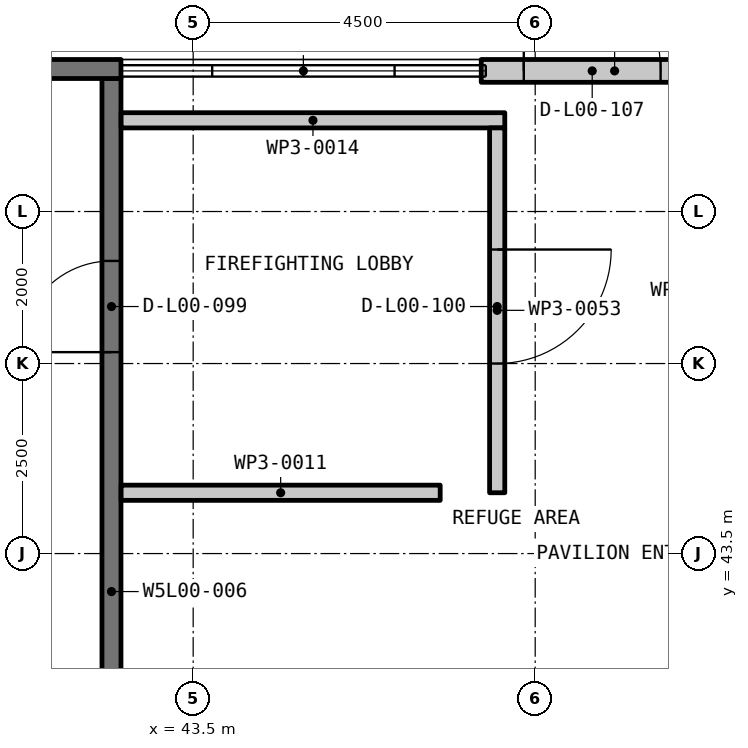
"""IFC4 building model, lengths in metres.
Left out: names, types, materials, properties, quantities, classifications, styles, units other than length and angle.
Written with IfcOpenShell. Run it as: python <this file> out.ifc"""

import sys

from ifc_helpers import new_model, si_unit, direction, frame, frame_2d, origin, place, context, subcontext, project, spatial, rectangle, extrude, element, fill, save


model = new_model("IFC4")
c1 = context("Model", 3, precision=1e-05, world=origin(), true_north=direction((0.0, 1.0)))
c2 = subcontext(c1, "Body", "Model", "MODEL_VIEW")
j1 = project(units=[si_unit("LENGTHUNIT", "METRE"), si_unit("PLANEANGLEUNIT", "RADIAN")], contexts=[c1])
p1 = place(None, origin())
s1 = spatial("IfcSite", under=j1, at=p1, CompositionType="ELEMENT")
p2 = place(p1, origin())
s2 = spatial("IfcBuilding", under=s1, at=p2, CompositionType="ELEMENT")
p3 = place(p2, origin())
s3 = spatial("IfcBuildingStorey", under=s2, at=p3, CompositionType="ELEMENT", Elevation=0.0)
p4 = place(p3, frame((42.425, 36.25, -0.2), z_axis=(0.0, 0.0, 1.0), x_axis=(0.0, 1.0, 0.0)))
e1 = element("IfcWall", 1, at=p4, inside=s3, PredefinedType="SHEAR", context=c2, shape_type="SweptSolid", body=[
    extrude(rectangle(XDim=13.5, YDim=0.25, at=frame_2d((6.75, 0.0))), origin(), (0.0, 0.0, 1.0), 5.9),
])
p5 = place(p4, frame((9.9, 0.0, 0.2)))
e2 = element("IfcOpeningElement", 2, at=p5, cuts=e1, PredefinedType="OPENING", context=c2, shape_type="SweptSolid", body=[
    extrude(rectangle(XDim=1.2, YDim=2.2, at=frame_2d((0.6, 1.1))), frame((0.0, 0.135, 0.0), z_axis=(0.0, -1.0, 0.0), x_axis=(1.0, 0.0, 0.0)), (0.0, 0.0, 1.0), 0.27),
])
p6 = place(p3, frame((36.0, 49.875, -0.2), z_axis=(0.0, 0.0, 1.0), x_axis=(1.0, 0.0, 0.0)))
e3 = element("IfcWall", 3, at=p6, inside=s3, PredefinedType="SHEAR", context=c2, shape_type="SweptSolid", body=[
    extrude(rectangle(XDim=6.55, YDim=0.25, at=frame_2d((3.275, 0.0))), origin(), (0.0, 0.0, 1.0), 5.9),
])
p7 = place(p3, frame((47.29, 49.85, 0.0), z_axis=(0.0, 0.0, 1.0), x_axis=(1.0, 0.0, 0.0)))
e4 = element("IfcWall", 4, at=p7, inside=s3, PredefinedType="SOLIDWALL", context=c2, shape_type="SweptSolid", body=[
    extrude(rectangle(XDim=3.51, YDim=0.3, at=frame_2d((1.755, 0.0))), origin(), (0.0, 0.0, 1.0), 4.9),
])
p8 = place(p7, frame((0.56, 0.0, 0.0)))
e5 = element("IfcOpeningElement", 5, at=p8, cuts=e4, PredefinedType="OPENING", context=c2, shape_type="SweptSolid", body=[
    extrude(rectangle(XDim=1.8, YDim=2.4, at=frame_2d((0.9, 1.2))), frame((0.0, 0.16, 0.0), z_axis=(0.0, -1.0, 0.0), x_axis=(1.0, 0.0, 0.0)), (0.0, 0.0, 1.0), 0.32),
])
p9 = place(p3, frame((42.552, 44.3, 0.0), z_axis=(0.0, 0.0, 1.0), x_axis=(1.0, 0.0, 0.0)))
e6 = element("IfcWall", 6, at=p9, inside=s3, PredefinedType="PARTITIONING", context=c2, shape_type="SweptSolid", body=[
    extrude(rectangle(XDim=4.198, YDim=0.2, at=frame_2d((2.099, 0.0))), origin(), (0.0, 0.0, 1.0), 5.7),
])
p10 = place(p3, frame((42.552, 49.2, 0.0), z_axis=(0.0, 0.0, 1.0), x_axis=(1.0, 0.0, 0.0)))
e7 = element("IfcWall", 7, at=p10, inside=s3, PredefinedType="PARTITIONING", context=c2, shape_type="SweptSolid", body=[
    extrude(rectangle(XDim=5.048, YDim=0.2, at=frame_2d((2.524, 0.0))), origin(), (0.0, 0.0, 1.0), 5.7),
])
p11 = place(p3, frame((47.5, 49.1, 0.0), z_axis=(0.0, 0.0, 1.0), x_axis=(0.0, -1.0, 0.0)))
e8 = element("IfcWall", 8, at=p11, inside=s3, PredefinedType="PARTITIONING", context=c2, shape_type="SweptSolid", body=[
    extrude(rectangle(XDim=4.8, YDim=0.2, at=frame_2d((2.4, 0.0))), origin(), (0.0, 0.0, 1.0), 5.7),
])
p12 = place(p11, frame((1.6, 0.0, 0.0)))
e9 = element("IfcOpeningElement", 9, at=p12, cuts=e8, PredefinedType="OPENING", context=c2, shape_type="SweptSolid", body=[
    extrude(rectangle(XDim=1.5, YDim=2.1, at=frame_2d((0.75, 1.05))), frame((0.0, 0.11, 0.0), z_axis=(0.0, -1.0, 0.0), x_axis=(1.0, 0.0, 0.0)), (0.0, 0.0, 1.0), 0.22),
])
p13 = place(p8, origin())
e10 = element("IfcDoor", 10, at=p13, inside=s3, OperationType="SINGLE_SWING_LEFT", PredefinedType="DOOR", context=c2, shape_type="SweptSolid", body=[
    extrude(rectangle(XDim=1.8, YDim=2.4, at=frame_2d((0.9, 1.2))), frame((0.0, 0.025, 0.0), z_axis=(0.0, -1.0, 0.0), x_axis=(1.0, 0.0, 0.0)), (0.0, 0.0, 1.0), 0.05),
])
fill(e5, e10)
p14 = place(p5, origin())
e11 = element("IfcDoor", 11, at=p14, inside=s3, OperationType="SINGLE_SWING_LEFT", PredefinedType="DOOR", context=c2, shape_type="SweptSolid", body=[
    extrude(rectangle(XDim=1.2, YDim=2.2, at=frame_2d((0.6, 1.1))), frame((0.0, 0.025, 0.0), z_axis=(0.0, -1.0, 0.0), x_axis=(1.0, 0.0, 0.0)), (0.0, 0.0, 1.0), 0.05),
])
fill(e2, e11)
p15 = place(p12, origin())
e12 = element("IfcDoor", 12, at=p15, inside=s3, OperationType="DOUBLE_DOOR_SINGLE_SWING", PredefinedType="DOOR", context=c2, shape_type="SweptSolid", body=[
    extrude(rectangle(XDim=1.5, YDim=2.1, at=frame_2d((0.75, 1.05))), frame((0.0, 0.025, 0.0), z_axis=(0.0, -1.0, 0.0), x_axis=(1.0, 0.0, 0.0)), (0.0, 0.0, 1.0), 0.05),
])
fill(e9, e12)
save(model, sys.argv[1])
